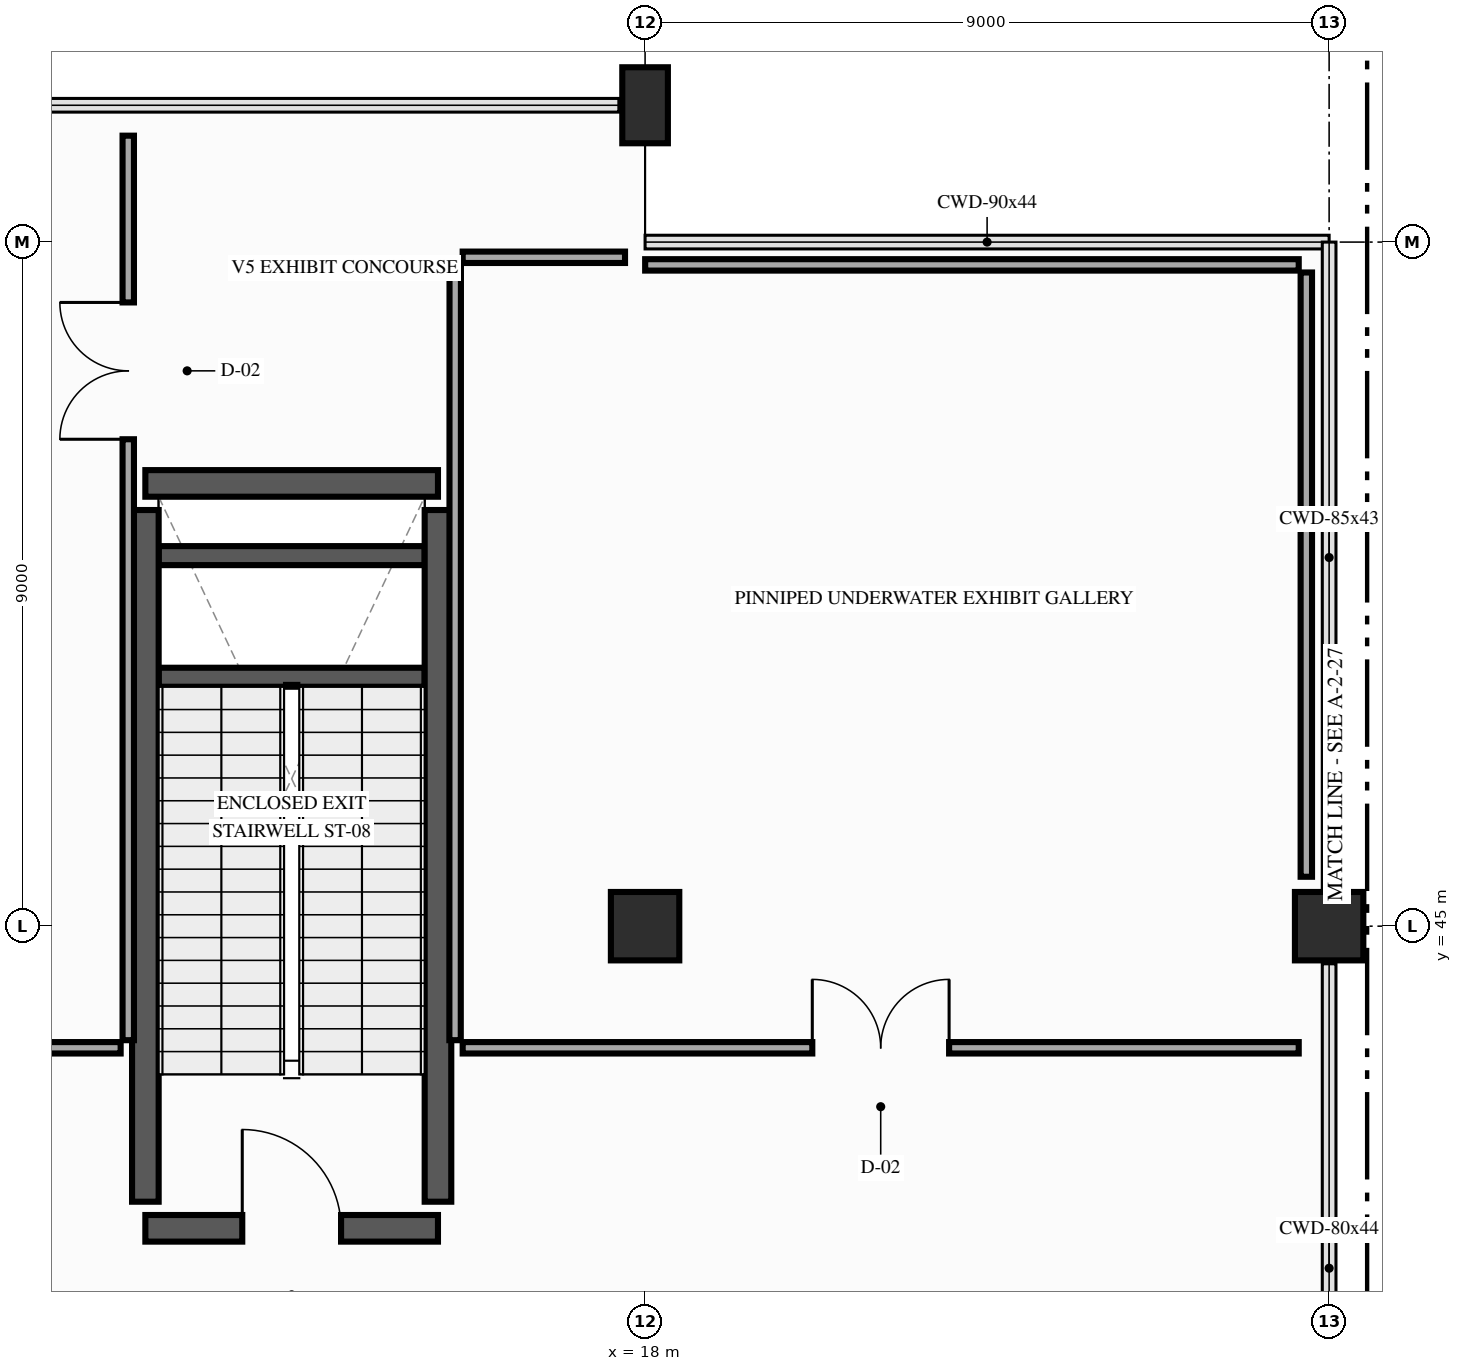
"""IFC4 building model, lengths in metres.
Left out: names, types, materials, properties, quantities, classifications, styles, units other than length and angle.
Written with IfcOpenShell. Run it as: python <this file> out.ifc"""

import sys

from ifc_helpers import new_model, si_unit, direction, frame, frame_2d, origin, origin_2d, place, context, subcontext, project, spatial, rectangle, extrude, element, fill, save


model = new_model("IFC4")
c1 = context("Model", 3, precision=1e-05, world=origin(), true_north=direction((0.0, 1.0)))
c2 = subcontext(c1, "Body", "Model", "MODEL_VIEW")
j1 = project(units=[si_unit("LENGTHUNIT", "METRE"), si_unit("PLANEANGLEUNIT", "RADIAN")], contexts=[c1])
p1 = place(None, origin())
s1 = spatial("IfcSite", under=j1, at=p1, CompositionType="ELEMENT")
p2 = place(p1, origin())
s2 = spatial("IfcBuilding", under=s1, at=p2, CompositionType="ELEMENT")
p3 = place(p2, frame((0.0, 0.0, 5.4)))
s3 = spatial("IfcBuildingStorey", under=s2, at=p3, CompositionType="ELEMENT", Elevation=5.4)
p4 = place(p3, frame((18.0, 45.0, 0.0), z_axis=(0.0, 0.0, 1.0), x_axis=(1.0, 0.0, 0.0)))
e1 = element("IfcColumn", 1, at=p4, inside=s3, PredefinedType="COLUMN", context=c2, shape_type="SweptSolid", body=[
    extrude(rectangle(XDim=0.9, YDim=0.9, at=origin_2d()), origin(), (0.0, 0.0, 1.0), 5.4),
])
p5 = place(p3, frame((18.0, 55.8, 0.0), z_axis=(0.0, 0.0, 1.0), x_axis=(1.0, 0.0, 0.0)))
e2 = element("IfcColumn", 2, at=p5, inside=s3, PredefinedType="PILASTER", context=c2, shape_type="SweptSolid", body=[
    extrude(rectangle(XDim=0.6, YDim=1.0, at=origin_2d()), origin(), (0.0, 0.0, 1.0), 5.4),
])
p6 = place(p3, frame((27.0, 45.0, 0.0), z_axis=(0.0, 0.0, 1.0), x_axis=(1.0, 0.0, 0.0)))
e3 = element("IfcColumn", 3, at=p6, inside=s3, PredefinedType="COLUMN", context=c2, shape_type="SweptSolid", body=[
    extrude(rectangle(XDim=0.9, YDim=0.9, at=origin_2d()), origin(), (0.0, 0.0, 1.0), 5.4),
])
for number, where, z_axis, x_axis in (
    (4, (11.6, 48.275, 0.0), (0.0, 0.0, 1.0), (1.0, 0.0, 0.0)),
    (5, (11.6, 49.875, 0.0), (0.0, 0.0, 1.0), (1.0, 0.0, 0.0)),
):
    element("IfcWall", number, at=place(p3, frame(where, z_axis=z_axis, x_axis=x_axis)), inside=s3, PredefinedType="SHEAR", context=c2, shape_type="SweptSolid", body=[
        extrude(rectangle(XDim=3.5, YDim=0.25, at=frame_2d((1.75, 0.0))), origin(), (0.0, 0.0, 1.0), 2.5),
    ])
p7 = place(p3, frame((11.425, 41.025, 0.0), z_axis=(0.0, 0.0, 1.0), x_axis=(1.0, 0.0, 0.0)))
e6 = element("IfcWall", 6, at=p7, inside=s3, PredefinedType="SHEAR", context=c2, shape_type="SweptSolid", body=[
    extrude(rectangle(XDim=3.85, YDim=0.35, at=frame_2d((1.925, 0.0))), origin(), (0.0, 0.0, 1.0), 5.15),
])
p8 = place(p7, frame((1.275, 0.0, 0.0)))
e7 = element("IfcOpeningElement", 7, at=p8, cuts=e6, PredefinedType="OPENING", context=c2, shape_type="SweptSolid", body=[
    extrude(rectangle(XDim=1.3, YDim=2.2, at=frame_2d((0.65, 1.1))), frame((0.0, 0.185, 0.0), z_axis=(0.0, -1.0, 0.0), x_axis=(1.0, 0.0, 0.0)), (0.0, 0.0, 1.0), 0.37),
])
p9 = place(p3, frame((11.425, 50.825, 0.0), z_axis=(0.0, 0.0, 1.0), x_axis=(1.0, 0.0, 0.0)))
e8 = element("IfcWall", 8, at=p9, inside=s3, PredefinedType="SHEAR", context=c2, shape_type="SweptSolid", body=[
    extrude(rectangle(XDim=3.85, YDim=0.35, at=frame_2d((1.925, 0.0))), origin(), (0.0, 0.0, 1.0), 5.15),
])
for number, where, z_axis, x_axis in (
    (9, (11.425, 41.375, 0.0), (0.0, 0.0, 1.0), (0.0, 1.0, 0.0)),
    (10, (15.275, 41.375, 0.0), (0.0, 0.0, 1.0), (0.0, 1.0, 0.0)),
):
    element("IfcWall", number, at=place(p3, frame(where, z_axis=z_axis, x_axis=x_axis)), inside=s3, PredefinedType="SHEAR", context=c2, shape_type="SweptSolid", body=[
        extrude(rectangle(XDim=9.1, YDim=0.35, at=frame_2d((4.55, 0.0))), origin(), (0.0, 0.0, 1.0), 5.15),
    ])
p10 = place(p3, frame((0.1, 43.4, 0.0), z_axis=(0.0, 0.0, 1.0), x_axis=(1.0, 0.0, 0.0)))
e11 = element("IfcWall", 11, at=p10, inside=s3, PredefinedType="PARTITIONING", context=c2, shape_type="SweptSolid", body=[
    extrude(rectangle(XDim=11.0, YDim=0.15, at=frame_2d((5.5, 0.0))), origin(), (0.0, 0.0, 1.0), 4.425),
])
p11 = place(p3, frame((11.2, 43.5, 0.0), z_axis=(0.0, 0.0, 1.0), x_axis=(0.0, 1.0, 0.0)))
e12 = element("IfcWall", 12, at=p11, inside=s3, PredefinedType="PARTITIONING", context=c2, shape_type="SweptSolid", body=[
    extrude(rectangle(XDim=11.9, YDim=0.15, at=frame_2d((5.95, 0.0))), origin(), (0.0, 0.0, 1.0), 4.375),
])
p12 = place(p11, frame((7.906, 0.0, 0.0)))
e13 = element("IfcOpeningElement", 13, at=p12, cuts=e12, PredefinedType="OPENING", context=c2, shape_type="SweptSolid", body=[
    extrude(rectangle(XDim=1.8, YDim=2.3, at=frame_2d((0.9, 1.15))), frame((0.0, 0.085, 0.0), z_axis=(0.0, -1.0, 0.0), x_axis=(1.0, 0.0, 0.0)), (0.0, 0.0, 1.0), 0.17),
])
p13 = place(p3, frame((15.502, 53.72, 0.0), z_axis=(0.0, 0.0, 1.0), x_axis=(-0.000191108666, -0.999999981739, 0.0)))
e14 = element("IfcWall", 14, at=p13, inside=s3, PredefinedType="PARTITIONING", context=c2, shape_type="SweptSolid", body=[
    extrude(rectangle(XDim=10.22, YDim=0.15, at=frame_2d((5.11, 0.0))), origin(), (0.0, 0.0, 1.0), 5.05),
])
p14 = place(p3, frame((15.6, 43.4, 0.0), z_axis=(0.0, 0.0, 1.0), x_axis=(1.0, 0.0, 0.0)))
e15 = element("IfcWall", 15, at=p14, inside=s3, PredefinedType="PARTITIONING", context=c2, shape_type="SweptSolid", body=[
    extrude(rectangle(XDim=11.0, YDim=0.15, at=frame_2d((5.5, 0.0))), origin(), (0.0, 0.0, 1.0), 4.425),
])
p15 = place(p14, frame((4.6, 0.0, 0.0)))
e16 = element("IfcOpeningElement", 16, at=p15, cuts=e15, PredefinedType="OPENING", context=c2, shape_type="SweptSolid", body=[
    extrude(rectangle(XDim=1.8, YDim=2.3, at=frame_2d((0.9, 1.15))), frame((0.0, 0.085, 0.0), z_axis=(0.0, -1.0, 0.0), x_axis=(1.0, 0.0, 0.0)), (0.0, 0.0, 1.0), 0.17),
])
p16 = place(p3, frame((26.7, 45.65, 0.0), z_axis=(0.0, 0.0, 1.0), x_axis=(0.0, 1.0, 0.0)))
e17 = element("IfcWall", 17, at=p16, inside=s3, PredefinedType="PARTITIONING", context=c2, shape_type="SweptSolid", body=[
    extrude(rectangle(XDim=7.95, YDim=0.15, at=frame_2d((3.975, 0.0))), origin(), (0.0, 0.0, 1.0), 5.05),
])
p17 = place(p3, frame((26.6, 53.7, 0.0), z_axis=(0.0, 0.0, 1.0), x_axis=(-1.0, 0.0, 0.0)))
e18 = element("IfcWall", 18, at=p17, inside=s3, PredefinedType="PARTITIONING", context=c2, shape_type="SweptSolid", body=[
    extrude(rectangle(XDim=8.599, YDim=0.15, at=frame_2d((4.3, 0.0))), origin(), (0.0, 0.0, 1.0), 4.425),
])
p18 = place(p3, frame((17.736, 53.8, 0.0), z_axis=(0.0, 0.0, 1.0), x_axis=(-1.0, 0.0, 0.0)))
e19 = element("IfcWall", 19, at=p18, inside=s3, PredefinedType="PARTITIONING", context=c2, shape_type="SweptSolid", body=[
    extrude(rectangle(XDim=2.136, YDim=0.15, at=frame_2d((1.068, 0.0))), origin(), (0.0, 0.0, 1.0), 4.425),
])
p19 = place(p8, origin())
e20 = element("IfcDoor", 20, at=p19, inside=s3, OperationType="SINGLE_SWING_LEFT", PredefinedType="DOOR", context=c2, shape_type="SweptSolid", body=[
    extrude(rectangle(XDim=1.3, YDim=2.2, at=frame_2d((0.65, 1.1))), frame((0.0, 0.025, 0.0), z_axis=(0.0, -1.0, 0.0), x_axis=(1.0, 0.0, 0.0)), (0.0, 0.0, 1.0), 0.05),
])
fill(e7, e20)
p20 = place(p12, origin())
e21 = element("IfcDoor", 21, at=p20, inside=s3, OperationType="DOUBLE_DOOR_SINGLE_SWING", PredefinedType="DOOR", context=c2, shape_type="SweptSolid", body=[
    extrude(rectangle(XDim=1.8, YDim=2.3, at=frame_2d((0.9, 1.15))), frame((0.0, 0.025, 0.0), z_axis=(0.0, -1.0, 0.0), x_axis=(1.0, 0.0, 0.0)), (0.0, 0.0, 1.0), 0.05),
])
fill(e13, e21)
p21 = place(p15, origin())
e22 = element("IfcDoor", 22, at=p21, inside=s3, OperationType="DOUBLE_DOOR_SINGLE_SWING", PredefinedType="DOOR", context=c2, shape_type="SweptSolid", body=[
    extrude(rectangle(XDim=1.8, YDim=2.3, at=frame_2d((0.9, 1.15))), frame((0.0, 0.025, 0.0), z_axis=(0.0, -1.0, 0.0), x_axis=(1.0, 0.0, 0.0)), (0.0, 0.0, 1.0), 0.05),
])
fill(e16, e22)
save(model, sys.argv[1])
